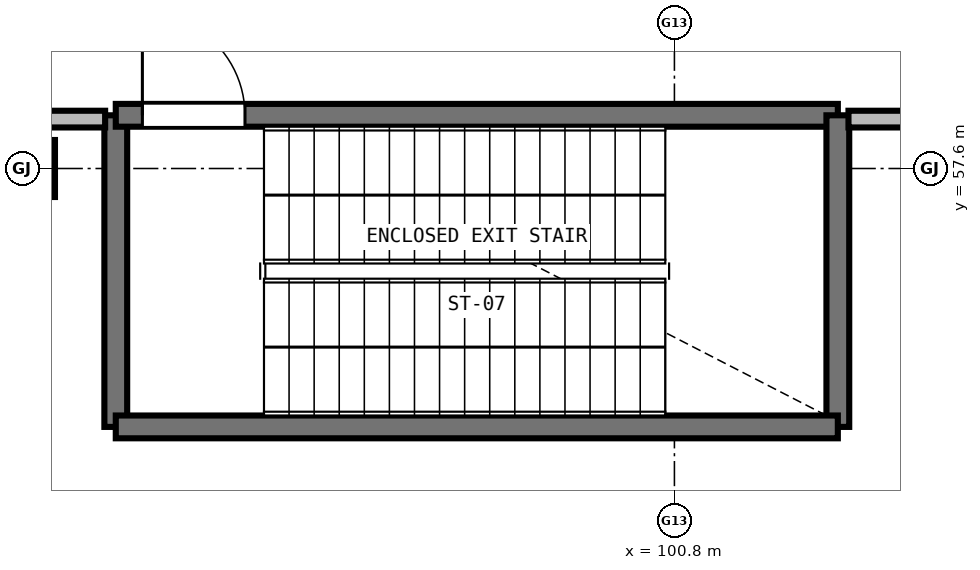
"""IFC4 building model, lengths in metres.
Left out: names, types, materials, properties, quantities, classifications, styles, units other than length and angle.
Written with IfcOpenShell. Run it as: python <this file> out.ifc"""

import sys

from ifc_helpers import new_model, si_unit, direction, frame, frame_2d, origin, origin_2d, place, context, subcontext, project, spatial, rectangle, extrude, element, fill, save


model = new_model("IFC4")
c1 = context("Model", 3, precision=1e-05, world=origin(), true_north=direction((0.0, 1.0)))
c2 = subcontext(c1, "Body", "Model", "MODEL_VIEW")
j1 = project(units=[si_unit("LENGTHUNIT", "METRE"), si_unit("PLANEANGLEUNIT", "RADIAN")], contexts=[c1])
p1 = place(None, origin())
s1 = spatial("IfcSite", under=j1, at=p1, CompositionType="ELEMENT")
p2 = place(p1, origin())
s2 = spatial("IfcBuilding", under=s1, at=p2, CompositionType="ELEMENT")
p3 = place(p2, origin())
s3 = spatial("IfcBuildingStorey", under=s2, at=p3, CompositionType="ELEMENT", Elevation=0.0)
p4 = place(p3, frame((92.4, 57.6, 0.0), z_axis=(0.0, 0.0, 1.0), x_axis=(1.0, 0.0, 0.0)))
e1 = element("IfcColumn", 1, at=p4, inside=s3, PredefinedType="COLUMN", context=c2, shape_type="SweptSolid", body=[
    extrude(rectangle(XDim=0.5, YDim=0.75, at=origin_2d()), origin(), (0.0, 0.0, 1.0), 5.1),
])
p5 = place(p3, frame((93.45, 54.2, 0.0), z_axis=(0.0, 0.0, 1.0), x_axis=(0.0, 1.0, 0.0)))
e2 = element("IfcWall", 2, at=p5, inside=s3, PredefinedType="SHEAR", context=c2, shape_type="SweptSolid", body=[
    extrude(rectangle(XDim=4.1, YDim=0.3, at=frame_2d((2.05, 0.0))), origin(), (0.0, 0.0, 1.0), 4.82),
])
p6 = place(p3, frame((93.45, 58.3, 0.0), z_axis=(0.0, 0.0, 1.0), x_axis=(1.0, 0.0, 0.0)))
e3 = element("IfcWall", 3, at=p6, inside=s3, PredefinedType="SHEAR", context=c2, shape_type="SweptSolid", body=[
    extrude(rectangle(XDim=9.5, YDim=0.3, at=frame_2d((4.75, 0.0))), origin(), (0.0, 0.0, 1.0), 4.82),
])
p7 = place(p6, frame((0.35, 0.0, 0.0)))
e4 = element("IfcOpeningElement", 4, at=p7, cuts=e3, PredefinedType="OPENING", context=c2, shape_type="SweptSolid", body=[
    extrude(rectangle(XDim=1.35, YDim=2.2, at=frame_2d((0.675, 1.1))), frame((0.0, 0.16, 0.0), z_axis=(0.0, -1.0, 0.0), x_axis=(1.0, 0.0, 0.0)), (0.0, 0.0, 1.0), 0.32),
])
p8 = place(p3, frame((102.95, 58.3, 0.0), z_axis=(0.0, 0.0, 1.0), x_axis=(0.0, -1.0, 0.0)))
e5 = element("IfcWall", 5, at=p8, inside=s3, PredefinedType="SHEAR", context=c2, shape_type="SweptSolid", body=[
    extrude(rectangle(XDim=4.1, YDim=0.3, at=frame_2d((2.05, 0.0))), origin(), (0.0, 0.0, 1.0), 4.82),
])
p9 = place(p3, frame((102.95, 54.2, 0.0), z_axis=(0.0, 0.0, 1.0), x_axis=(-1.0, 0.0, 0.0)))
e6 = element("IfcWall", 6, at=p9, inside=s3, PredefinedType="SHEAR", context=c2, shape_type="SweptSolid", body=[
    extrude(rectangle(XDim=9.5, YDim=0.3, at=frame_2d((4.75, 0.0))), origin(), (0.0, 0.0, 1.0), 4.82),
])
p10 = place(p3, frame((126.0, 58.25, 0.0), z_axis=(0.0, 0.0, 1.0), x_axis=(-1.0, 0.0, 0.0)))
e7 = element("IfcWall", 7, at=p10, inside=s3, PredefinedType="SOLIDWALL", context=c2, shape_type="SweptSolid", body=[
    extrude(rectangle(XDim=22.91, YDim=0.22, at=frame_2d((11.455, 0.0))), origin(), (0.0, 0.0, 1.0), 4.105),
])
p11 = place(p3, frame((93.31, 58.25, 0.0), z_axis=(0.0, 0.0, 1.0), x_axis=(-1.0, 0.0, 0.0)))
e8 = element("IfcWall", 8, at=p11, inside=s3, PredefinedType="SOLIDWALL", context=c2, shape_type="SweptSolid", body=[
    extrude(rectangle(XDim=9.31, YDim=0.22, at=frame_2d((4.655, 0.0))), origin(), (0.0, 0.0, 1.0), 4.105),
])
p12 = place(p11, frame((4.335, 0.0, 0.0)))
e9 = element("IfcOpeningElement", 9, at=p12, cuts=e8, PredefinedType="OPENING", context=c2, shape_type="SweptSolid", body=[
    extrude(rectangle(XDim=1.55, YDim=2.2, at=frame_2d((0.775, 1.1))), frame((0.0, 0.12, 0.0), z_axis=(0.0, -1.0, 0.0), x_axis=(1.0, 0.0, 0.0)), (0.0, 0.0, 1.0), 0.24),
])
p13 = place(p7, origin())
e10 = element("IfcDoor", 10, at=p13, inside=s3, OperationType="SINGLE_SWING_LEFT", PredefinedType="DOOR", context=c2, shape_type="SweptSolid", body=[
    extrude(rectangle(XDim=1.35, YDim=2.2, at=frame_2d((0.675, 1.1))), frame((0.0, 0.025, 0.0), z_axis=(0.0, -1.0, 0.0), x_axis=(1.0, 0.0, 0.0)), (0.0, 0.0, 1.0), 0.05),
])
fill(e4, e10)
save(model, sys.argv[1])
